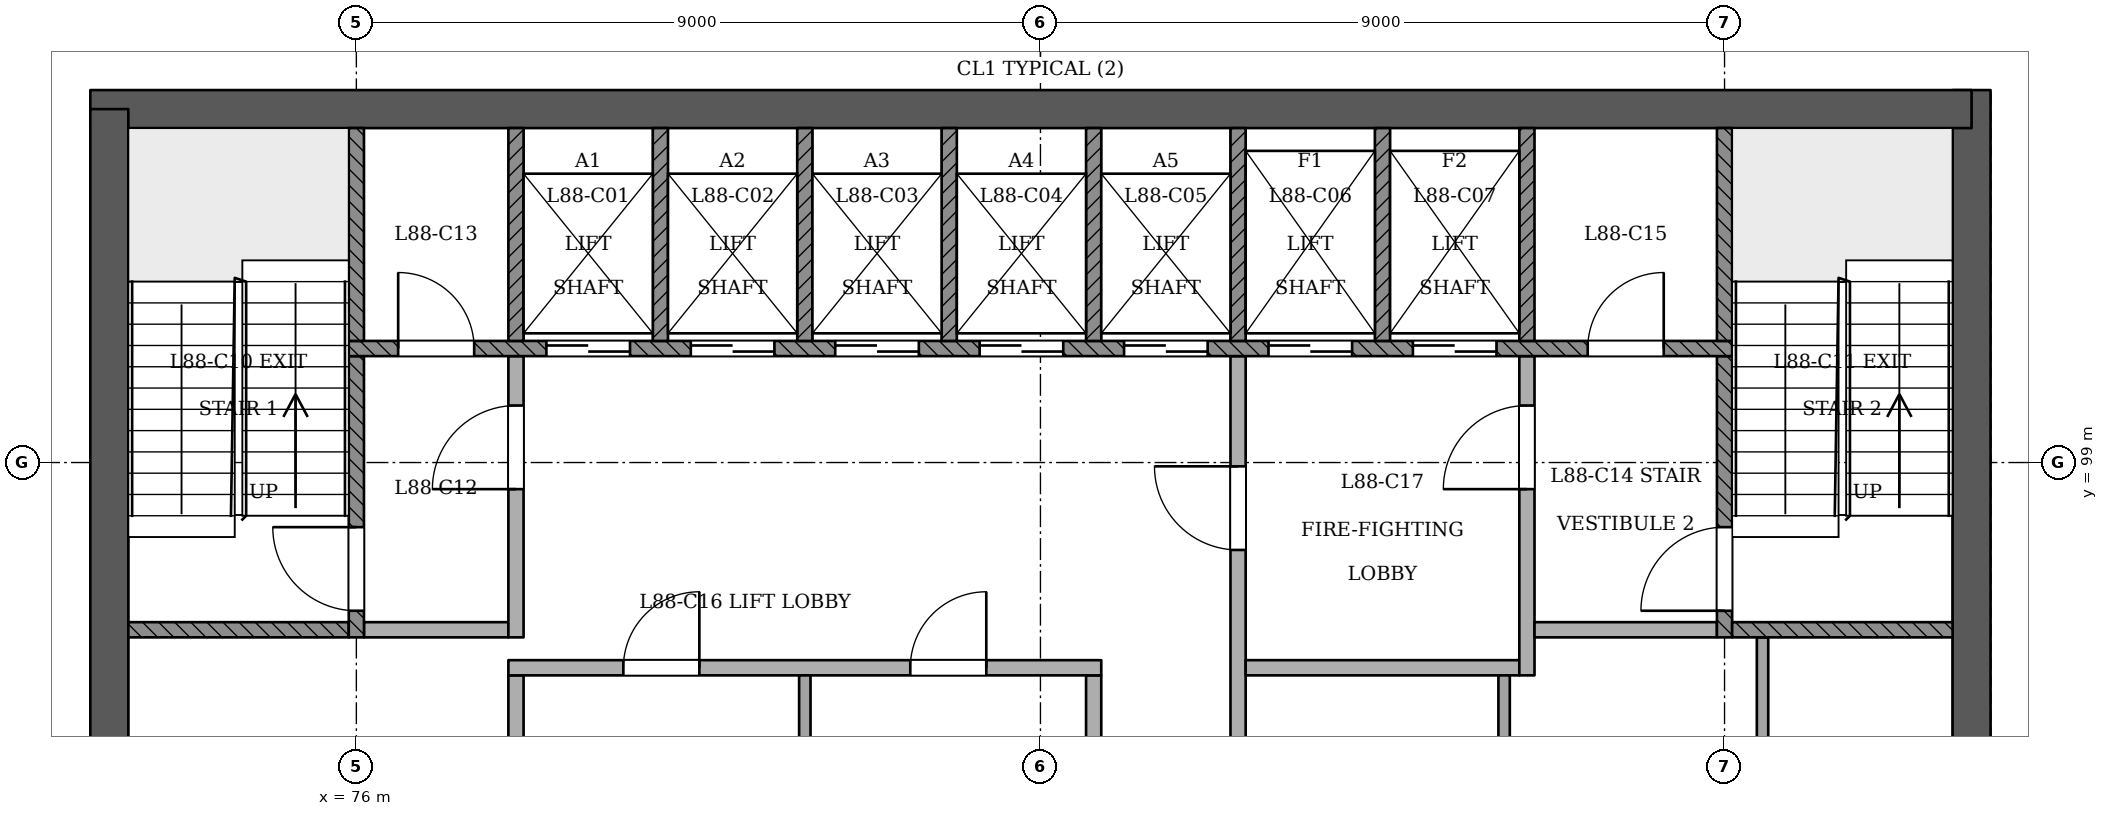
"""IFC4 building model, lengths in metres.
Left out: names, types, materials, properties, quantities, classifications, styles, units other than length and angle.
Written with IfcOpenShell. Run it as: python <this file> out.ifc"""

import sys

from ifc_helpers import new_model, si_unit, direction, frame, frame_2d, origin, place, context, subcontext, project, spatial, rectangle, extrude, element, fill, save


model = new_model("IFC4")
c1 = context("Model", 3, precision=1e-05, world=origin(), true_north=direction((0.0, 1.0)))
c2 = subcontext(c1, "Body", "Model", "MODEL_VIEW")
j1 = project(units=[si_unit("LENGTHUNIT", "METRE"), si_unit("PLANEANGLEUNIT", "RADIAN")], contexts=[c1])
p1 = place(None, origin())
s1 = spatial("IfcSite", under=j1, at=p1, CompositionType="ELEMENT")
p2 = place(p1, origin())
s2 = spatial("IfcBuilding", under=s1, at=p2, CompositionType="ELEMENT")
p3 = place(p2, frame((0.0, 0.0, 338.8)))
s3 = spatial("IfcBuildingStorey", under=s2, at=p3, CompositionType="ELEMENT", Elevation=338.8)
p4 = place(p3, frame((97.25, 93.15, 0.0), z_axis=(0.0, 0.0, 1.0), x_axis=(0.0, 1.0, 0.0)))
e1 = element("IfcWall", 1, at=p4, inside=s3, PredefinedType="SHEAR", context=c2, shape_type="SweptSolid", body=[
    extrude(rectangle(XDim=10.75, YDim=0.5, at=frame_2d((5.375, 0.0))), origin(), (0.0, 0.0, 1.0), 4.2),
])
p5 = place(p3, frame((97.25, 103.65, 0.0), z_axis=(0.0, 0.0, 1.0), x_axis=(-1.0, 0.0, 0.0)))
e2 = element("IfcWall", 2, at=p5, inside=s3, PredefinedType="SHEAR", context=c2, shape_type="SweptSolid", body=[
    extrude(rectangle(XDim=24.75, YDim=0.5, at=frame_2d((12.375, 0.0))), origin(), (0.0, 0.0, 1.0), 4.2),
])
p6 = place(p3, frame((72.75, 103.65, 0.0), z_axis=(0.0, 0.0, 1.0), x_axis=(0.0, -1.0, 0.0)))
e3 = element("IfcWall", 3, at=p6, inside=s3, PredefinedType="SHEAR", context=c2, shape_type="SweptSolid", body=[
    extrude(rectangle(XDim=10.75, YDim=0.5, at=frame_2d((5.375, 0.0))), origin(), (0.0, 0.0, 1.0), 4.2),
])
p7 = place(p3, frame((78.1, 93.4, 0.0), z_axis=(0.0, 0.0, 1.0), x_axis=(0.0, 1.0, 0.0)))
e4 = element("IfcWall", 4, at=p7, inside=s3, PredefinedType="PARTITIONING", context=c2, shape_type="SweptSolid", body=[
    extrude(rectangle(XDim=2.8, YDim=0.2, at=frame_2d((1.4, 0.0))), origin(), (0.0, 0.0, 1.0), 3.9),
])
p8 = place(p3, frame((81.9, 93.4, 0.0), z_axis=(0.0, 0.0, 1.0), x_axis=(0.0, 1.0, 0.0)))
e5 = element("IfcWall", 5, at=p8, inside=s3, PredefinedType="PARTITIONING", context=c2, shape_type="SweptSolid", body=[
    extrude(rectangle(XDim=2.8, YDim=0.15, at=frame_2d((1.4, 0.0))), origin(), (0.0, 0.0, 1.0), 3.9),
])
p9 = place(p3, frame((85.7, 93.4, 0.0), z_axis=(0.0, 0.0, 1.0), x_axis=(0.0, 1.0, 0.0)))
e6 = element("IfcWall", 6, at=p9, inside=s3, PredefinedType="PARTITIONING", context=c2, shape_type="SweptSolid", body=[
    extrude(rectangle(XDim=2.8, YDim=0.2, at=frame_2d((1.4, 0.0))), origin(), (0.0, 0.0, 1.0), 3.9),
])
p10 = place(p3, frame((87.6, 93.4, 0.0), z_axis=(0.0, 0.0, 1.0), x_axis=(0.0, 1.0, 0.0)))
e7 = element("IfcWall", 7, at=p10, inside=s3, PredefinedType="PARTITIONING", context=c2, shape_type="SweptSolid", body=[
    extrude(rectangle(XDim=7.0, YDim=0.2, at=frame_2d((3.5, 0.0))), origin(), (0.0, 0.0, 1.0), 3.9),
])
p11 = place(p10, frame((4.45, 0.0, 0.0)))
e8 = element("IfcOpeningElement", 8, at=p11, cuts=e7, PredefinedType="OPENING", context=c2, shape_type="SweptSolid", body=[
    extrude(rectangle(XDim=1.1, YDim=2.1, at=frame_2d((0.55, 1.05))), frame((0.0, 0.11, 0.0), z_axis=(0.0, -1.0, 0.0), x_axis=(1.0, 0.0, 0.0)), (0.0, 0.0, 1.0), 0.221),
])
p12 = place(p3, frame((91.1, 93.4, 0.0), z_axis=(0.0, 0.0, 1.0), x_axis=(0.0, 1.0, 0.0)))
e9 = element("IfcWall", 9, at=p12, inside=s3, PredefinedType="PARTITIONING", context=c2, shape_type="SweptSolid", body=[
    extrude(rectangle(XDim=2.8, YDim=0.15, at=frame_2d((1.4, 0.0))), origin(), (0.0, 0.0, 1.0), 3.9),
])
p13 = place(p3, frame((94.5, 93.4, 0.0), z_axis=(0.0, 0.0, 1.0), x_axis=(0.0, 1.0, 0.0)))
e10 = element("IfcWall", 10, at=p13, inside=s3, PredefinedType="PARTITIONING", context=c2, shape_type="SweptSolid", body=[
    extrude(rectangle(XDim=3.3, YDim=0.15, at=frame_2d((1.65, 0.0))), origin(), (0.0, 0.0, 1.0), 3.9),
])
p14 = place(p3, frame((78.0, 96.3, 0.0), z_axis=(0.0, 0.0, 1.0), x_axis=(1.0, 0.0, 0.0)))
e11 = element("IfcWall", 11, at=p14, inside=s3, PredefinedType="PARTITIONING", context=c2, shape_type="SweptSolid", body=[
    extrude(rectangle(XDim=7.8, YDim=0.2, at=frame_2d((3.9, 0.0))), origin(), (0.0, 0.0, 1.0), 3.9),
])
p15 = place(p14, frame((1.512, 0.0, 0.0)))
e12 = element("IfcOpeningElement", 12, at=p15, cuts=e11, PredefinedType="OPENING", context=c2, shape_type="SweptSolid", body=[
    extrude(rectangle(XDim=1.0, YDim=2.1, at=frame_2d((0.5, 1.05))), frame((0.0, 0.11, 0.0), z_axis=(0.0, -1.0, 0.0), x_axis=(1.0, 0.0, 0.0)), (0.0, 0.0, 1.0), 0.221),
])
p16 = place(p14, frame((5.288, 0.0, 0.0)))
e13 = element("IfcOpeningElement", 13, at=p16, cuts=e11, PredefinedType="OPENING", context=c2, shape_type="SweptSolid", body=[
    extrude(rectangle(XDim=1.0, YDim=2.1, at=frame_2d((0.5, 1.05))), frame((0.0, 0.11, 0.0), z_axis=(0.0, -1.0, 0.0), x_axis=(1.0, 0.0, 0.0)), (0.0, 0.0, 1.0), 0.221),
])
p17 = place(p3, frame((87.7, 96.3, 0.0), z_axis=(0.0, 0.0, 1.0), x_axis=(1.0, 0.0, 0.0)))
e14 = element("IfcWall", 14, at=p17, inside=s3, PredefinedType="PARTITIONING", context=c2, shape_type="SweptSolid", body=[
    extrude(rectangle(XDim=3.6, YDim=0.2, at=frame_2d((1.8, 0.0))), origin(), (0.0, 0.0, 1.0), 3.9),
])
p18 = place(p3, frame((91.4, 96.2, 0.0), z_axis=(0.0, 0.0, 1.0), x_axis=(0.0, 1.0, 0.0)))
e15 = element("IfcWall", 15, at=p18, inside=s3, PredefinedType="PARTITIONING", context=c2, shape_type="SweptSolid", body=[
    extrude(rectangle(XDim=4.2, YDim=0.2, at=frame_2d((2.1, 0.0))), origin(), (0.0, 0.0, 1.0), 3.9),
])
p19 = place(p18, frame((2.45, 0.0, 0.0)))
e16 = element("IfcOpeningElement", 16, at=p19, cuts=e15, PredefinedType="OPENING", context=c2, shape_type="SweptSolid", body=[
    extrude(rectangle(XDim=1.1, YDim=2.1, at=frame_2d((0.55, 1.05))), frame((0.0, 0.11, 0.0), z_axis=(0.0, -1.0, 0.0), x_axis=(1.0, 0.0, 0.0)), (0.0, 0.0, 1.0), 0.221),
])
p20 = place(p3, frame((73.0, 96.8, 0.0), z_axis=(0.0, 0.0, 1.0), x_axis=(1.0, 0.0, 0.0)))
e17 = element("IfcWall", 17, at=p20, inside=s3, PredefinedType="SOLIDWALL", context=c2, shape_type="SweptSolid", body=[
    extrude(rectangle(XDim=2.9, YDim=0.2, at=frame_2d((1.45, 0.0))), origin(), (0.0, 0.0, 1.0), 3.9),
])
p21 = place(p3, frame((76.0, 96.7, 0.0), z_axis=(0.0, 0.0, 1.0), x_axis=(0.0, 1.0, 0.0)))
e18 = element("IfcWall", 18, at=p21, inside=s3, PredefinedType="SOLIDWALL", context=c2, shape_type="SweptSolid", body=[
    extrude(rectangle(XDim=3.7, YDim=0.2, at=frame_2d((1.85, 0.0))), origin(), (0.0, 0.0, 1.0), 3.9),
])
p22 = place(p21, frame((0.35, 0.0, 0.0)))
e19 = element("IfcOpeningElement", 19, at=p22, cuts=e18, PredefinedType="OPENING", context=c2, shape_type="SweptSolid", body=[
    extrude(rectangle(XDim=1.1, YDim=2.1, at=frame_2d((0.55, 1.05))), frame((0.0, 0.11, 0.0), z_axis=(0.0, -1.0, 0.0), x_axis=(1.0, 0.0, 0.0)), (0.0, 0.0, 1.0), 0.221),
])
p23 = place(p3, frame((76.1, 96.8, 0.0), z_axis=(0.0, 0.0, 1.0), x_axis=(1.0, 0.0, 0.0)))
e20 = element("IfcWall", 20, at=p23, inside=s3, PredefinedType="PARTITIONING", context=c2, shape_type="SweptSolid", body=[
    extrude(rectangle(XDim=1.9, YDim=0.2, at=frame_2d((0.95, 0.0))), origin(), (0.0, 0.0, 1.0), 3.9),
])
p24 = place(p3, frame((78.1, 96.7, 0.0), z_axis=(0.0, 0.0, 1.0), x_axis=(0.0, 1.0, 0.0)))
e21 = element("IfcWall", 21, at=p24, inside=s3, PredefinedType="PARTITIONING", context=c2, shape_type="SweptSolid", body=[
    extrude(rectangle(XDim=3.7, YDim=0.2, at=frame_2d((1.85, 0.0))), origin(), (0.0, 0.0, 1.0), 3.9),
])
p25 = place(p24, frame((1.95, 0.0, 0.0)))
e22 = element("IfcOpeningElement", 22, at=p25, cuts=e21, PredefinedType="OPENING", context=c2, shape_type="SweptSolid", body=[
    extrude(rectangle(XDim=1.1, YDim=2.1, at=frame_2d((0.55, 1.05))), frame((0.0, 0.11, 0.0), z_axis=(0.0, -1.0, 0.0), x_axis=(1.0, 0.0, 0.0)), (0.0, 0.0, 1.0), 0.221),
])
p26 = place(p3, frame((91.5, 96.8, 0.0), z_axis=(0.0, 0.0, 1.0), x_axis=(1.0, 0.0, 0.0)))
e23 = element("IfcWall", 23, at=p26, inside=s3, PredefinedType="PARTITIONING", context=c2, shape_type="SweptSolid", body=[
    extrude(rectangle(XDim=2.4, YDim=0.2, at=frame_2d((1.2, 0.0))), origin(), (0.0, 0.0, 1.0), 3.9),
])
p27 = place(p3, frame((94.0, 96.7, 0.0), z_axis=(0.0, 0.0, 1.0), x_axis=(0.0, 1.0, 0.0)))
e24 = element("IfcWall", 24, at=p27, inside=s3, PredefinedType="SOLIDWALL", context=c2, shape_type="SweptSolid", body=[
    extrude(rectangle(XDim=3.7, YDim=0.2, at=frame_2d((1.85, 0.0))), origin(), (0.0, 0.0, 1.0), 3.9),
])
p28 = place(p27, frame((0.35, 0.0, 0.0)))
e25 = element("IfcOpeningElement", 25, at=p28, cuts=e24, PredefinedType="OPENING", context=c2, shape_type="SweptSolid", body=[
    extrude(rectangle(XDim=1.1, YDim=2.1, at=frame_2d((0.55, 1.05))), frame((0.0, 0.11, 0.0), z_axis=(0.0, -1.0, 0.0), x_axis=(1.0, 0.0, 0.0)), (0.0, 0.0, 1.0), 0.221),
])
p29 = place(p3, frame((94.1, 96.8, 0.0), z_axis=(0.0, 0.0, 1.0), x_axis=(1.0, 0.0, 0.0)))
e26 = element("IfcWall", 26, at=p29, inside=s3, PredefinedType="SOLIDWALL", context=c2, shape_type="SweptSolid", body=[
    extrude(rectangle(XDim=2.9, YDim=0.2, at=frame_2d((1.45, 0.0))), origin(), (0.0, 0.0, 1.0), 3.9),
])
p30 = place(p3, frame((75.9, 100.5, 0.0), z_axis=(0.0, 0.0, 1.0), x_axis=(1.0, 0.0, 0.0)))
e27 = element("IfcWall", 27, at=p30, inside=s3, PredefinedType="SOLIDWALL", context=c2, shape_type="SweptSolid", body=[
    extrude(rectangle(XDim=18.2, YDim=0.2, at=frame_2d((9.1, 0.0))), origin(), (0.0, 0.0, 1.0), 3.9),
])
p31 = place(p30, frame((2.6, 0.0, 0.0)))
e28 = element("IfcOpeningElement", 28, at=p31, cuts=e27, PredefinedType="OPENING", context=c2, shape_type="SweptSolid", body=[
    extrude(rectangle(XDim=1.1, YDim=2.1, at=frame_2d((0.55, 1.05))), frame((0.0, 0.11, 0.0), z_axis=(0.0, -1.0, 0.0), x_axis=(1.0, 0.0, 0.0)), (0.0, 0.0, 1.0), 0.221),
])
p32 = place(p30, frame((4.5, 0.0, 0.0)))
e29 = element("IfcOpeningElement", 29, at=p32, cuts=e27, PredefinedType="OPENING", context=c2, shape_type="SweptSolid", body=[
    extrude(rectangle(XDim=1.1, YDim=2.1, at=frame_2d((0.55, 1.05))), frame((0.0, 0.11, 0.0), z_axis=(0.0, -1.0, 0.0), x_axis=(1.0, 0.0, 0.0)), (0.0, 0.0, 1.0), 0.221),
])
p33 = place(p30, frame((6.4, 0.0, 0.0)))
e30 = element("IfcOpeningElement", 30, at=p33, cuts=e27, PredefinedType="OPENING", context=c2, shape_type="SweptSolid", body=[
    extrude(rectangle(XDim=1.1, YDim=2.1, at=frame_2d((0.55, 1.05))), frame((0.0, 0.11, 0.0), z_axis=(0.0, -1.0, 0.0), x_axis=(1.0, 0.0, 0.0)), (0.0, 0.0, 1.0), 0.221),
])
p34 = place(p30, frame((8.3, 0.0, 0.0)))
e31 = element("IfcOpeningElement", 31, at=p34, cuts=e27, PredefinedType="OPENING", context=c2, shape_type="SweptSolid", body=[
    extrude(rectangle(XDim=1.1, YDim=2.1, at=frame_2d((0.55, 1.05))), frame((0.0, 0.11, 0.0), z_axis=(0.0, -1.0, 0.0), x_axis=(1.0, 0.0, 0.0)), (0.0, 0.0, 1.0), 0.221),
])
p35 = place(p30, frame((10.2, 0.0, 0.0)))
e32 = element("IfcOpeningElement", 32, at=p35, cuts=e27, PredefinedType="OPENING", context=c2, shape_type="SweptSolid", body=[
    extrude(rectangle(XDim=1.1, YDim=2.1, at=frame_2d((0.55, 1.05))), frame((0.0, 0.11, 0.0), z_axis=(0.0, -1.0, 0.0), x_axis=(1.0, 0.0, 0.0)), (0.0, 0.0, 1.0), 0.221),
])
p36 = place(p30, frame((12.1, 0.0, 0.0)))
e33 = element("IfcOpeningElement", 33, at=p36, cuts=e27, PredefinedType="OPENING", context=c2, shape_type="SweptSolid", body=[
    extrude(rectangle(XDim=1.1, YDim=2.1, at=frame_2d((0.55, 1.05))), frame((0.0, 0.11, 0.0), z_axis=(0.0, -1.0, 0.0), x_axis=(1.0, 0.0, 0.0)), (0.0, 0.0, 1.0), 0.221),
])
p37 = place(p30, frame((14.0, 0.0, 0.0)))
e34 = element("IfcOpeningElement", 34, at=p37, cuts=e27, PredefinedType="OPENING", context=c2, shape_type="SweptSolid", body=[
    extrude(rectangle(XDim=1.1, YDim=2.1, at=frame_2d((0.55, 1.05))), frame((0.0, 0.11, 0.0), z_axis=(0.0, -1.0, 0.0), x_axis=(1.0, 0.0, 0.0)), (0.0, 0.0, 1.0), 0.221),
])
p38 = place(p30, frame((0.65, 0.0, 0.0)))
e35 = element("IfcOpeningElement", 35, at=p38, cuts=e27, PredefinedType="OPENING", context=c2, shape_type="SweptSolid", body=[
    extrude(rectangle(XDim=1.0, YDim=2.1, at=frame_2d((0.5, 1.05))), frame((0.0, 0.11, 0.0), z_axis=(0.0, -1.0, 0.0), x_axis=(1.0, 0.0, 0.0)), (0.0, 0.0, 1.0), 0.221),
])
p39 = place(p30, frame((16.3, 0.0, 0.0)))
e36 = element("IfcOpeningElement", 36, at=p39, cuts=e27, PredefinedType="OPENING", context=c2, shape_type="SweptSolid", body=[
    extrude(rectangle(XDim=1.0, YDim=2.1, at=frame_2d((0.5, 1.05))), frame((0.0, 0.11, 0.0), z_axis=(0.0, -1.0, 0.0), x_axis=(1.0, 0.0, 0.0)), (0.0, 0.0, 1.0), 0.221),
])
for number, where, z_axis, x_axis in (
    (37, (76.0, 100.6, 0.0), (0.0, 0.0, 1.0), (0.0, 1.0, 0.0)),
    (38, (78.1, 100.6, 0.0), (0.0, 0.0, 1.0), (0.0, 1.0, 0.0)),
    (39, (80.0, 100.6, 0.0), (0.0, 0.0, 1.0), (0.0, 1.0, 0.0)),
    (40, (81.9, 100.6, 0.0), (0.0, 0.0, 1.0), (0.0, 1.0, 0.0)),
    (41, (83.8, 100.6, 0.0), (0.0, 0.0, 1.0), (0.0, 1.0, 0.0)),
    (42, (85.7, 100.6, 0.0), (0.0, 0.0, 1.0), (0.0, 1.0, 0.0)),
    (43, (87.6, 100.6, 0.0), (0.0, 0.0, 1.0), (0.0, 1.0, 0.0)),
    (44, (89.5, 100.6, 0.0), (0.0, 0.0, 1.0), (0.0, 1.0, 0.0)),
    (45, (91.4, 100.6, 0.0), (0.0, 0.0, 1.0), (0.0, 1.0, 0.0)),
    (46, (94.0, 100.6, 0.0), (0.0, 0.0, 1.0), (0.0, 1.0, 0.0)),
):
    element("IfcWall", number, at=place(p3, frame(where, z_axis=z_axis, x_axis=x_axis)), inside=s3, PredefinedType="SOLIDWALL", context=c2, shape_type="SweptSolid", body=[
        extrude(rectangle(XDim=2.8, YDim=0.2, at=frame_2d((1.4, 0.0))), origin(), (0.0, 0.0, 1.0), 3.9),
    ])
p40 = place(p31, origin())
e47 = element("IfcDoor", 47, at=p40, inside=s3, OperationType="SLIDING_TO_RIGHT", PredefinedType="NOTDEFINED", context=c2, shape_type="SweptSolid", body=[
    extrude(rectangle(XDim=1.1, YDim=2.1, at=frame_2d((0.55, 1.05))), frame((0.0, 0.025, 0.0), z_axis=(0.0, -1.0, 0.0), x_axis=(1.0, 0.0, 0.0)), (0.0, 0.0, 1.0), 0.05),
])
fill(e28, e47)
p41 = place(p32, origin())
e48 = element("IfcDoor", 48, at=p41, inside=s3, OperationType="SLIDING_TO_LEFT", PredefinedType="NOTDEFINED", context=c2, shape_type="SweptSolid", body=[
    extrude(rectangle(XDim=1.1, YDim=2.1, at=frame_2d((0.55, 1.05))), frame((0.0, 0.025, 0.0), z_axis=(0.0, -1.0, 0.0), x_axis=(1.0, 0.0, 0.0)), (0.0, 0.0, 1.0), 0.05),
])
fill(e29, e48)
p42 = place(p33, origin())
e49 = element("IfcDoor", 49, at=p42, inside=s3, OperationType="SLIDING_TO_RIGHT", PredefinedType="NOTDEFINED", context=c2, shape_type="SweptSolid", body=[
    extrude(rectangle(XDim=1.1, YDim=2.1, at=frame_2d((0.55, 1.05))), frame((0.0, 0.025, 0.0), z_axis=(0.0, -1.0, 0.0), x_axis=(1.0, 0.0, 0.0)), (0.0, 0.0, 1.0), 0.05),
])
fill(e30, e49)
p43 = place(p34, origin())
e50 = element("IfcDoor", 50, at=p43, inside=s3, OperationType="SLIDING_TO_LEFT", PredefinedType="NOTDEFINED", context=c2, shape_type="SweptSolid", body=[
    extrude(rectangle(XDim=1.1, YDim=2.1, at=frame_2d((0.55, 1.05))), frame((0.0, 0.025, 0.0), z_axis=(0.0, -1.0, 0.0), x_axis=(1.0, 0.0, 0.0)), (0.0, 0.0, 1.0), 0.05),
])
fill(e31, e50)
p44 = place(p35, origin())
e51 = element("IfcDoor", 51, at=p44, inside=s3, OperationType="SLIDING_TO_RIGHT", PredefinedType="NOTDEFINED", context=c2, shape_type="SweptSolid", body=[
    extrude(rectangle(XDim=1.1, YDim=2.1, at=frame_2d((0.55, 1.05))), frame((0.0, 0.025, 0.0), z_axis=(0.0, -1.0, 0.0), x_axis=(1.0, 0.0, 0.0)), (0.0, 0.0, 1.0), 0.05),
])
fill(e32, e51)
p45 = place(p36, origin())
e52 = element("IfcDoor", 52, at=p45, inside=s3, OperationType="SLIDING_TO_RIGHT", PredefinedType="NOTDEFINED", context=c2, shape_type="SweptSolid", body=[
    extrude(rectangle(XDim=1.1, YDim=2.1, at=frame_2d((0.55, 1.05))), frame((0.0, 0.025, 0.0), z_axis=(0.0, -1.0, 0.0), x_axis=(1.0, 0.0, 0.0)), (0.0, 0.0, 1.0), 0.05),
])
fill(e33, e52)
p46 = place(p37, origin())
e53 = element("IfcDoor", 53, at=p46, inside=s3, OperationType="SLIDING_TO_LEFT", PredefinedType="NOTDEFINED", context=c2, shape_type="SweptSolid", body=[
    extrude(rectangle(XDim=1.1, YDim=2.1, at=frame_2d((0.55, 1.05))), frame((0.0, 0.025, 0.0), z_axis=(0.0, -1.0, 0.0), x_axis=(1.0, 0.0, 0.0)), (0.0, 0.0, 1.0), 0.05),
])
fill(e34, e53)
p47 = place(p22, origin())
e54 = element("IfcDoor", 54, at=p47, inside=s3, OperationType="SINGLE_SWING_RIGHT", PredefinedType="NOTDEFINED", context=c2, shape_type="SweptSolid", body=[
    extrude(rectangle(XDim=1.1, YDim=2.1, at=frame_2d((0.55, 1.05))), frame((0.0, 0.025, 0.0), z_axis=(0.0, -1.0, 0.0), x_axis=(1.0, 0.0, 0.0)), (0.0, 0.0, 1.0), 0.05),
])
fill(e19, e54)
p48 = place(p28, origin())
e55 = element("IfcDoor", 55, at=p48, inside=s3, OperationType="SINGLE_SWING_LEFT", PredefinedType="NOTDEFINED", context=c2, shape_type="SweptSolid", body=[
    extrude(rectangle(XDim=1.1, YDim=2.1, at=frame_2d((0.55, 1.05))), frame((0.0, 0.025, 0.0), z_axis=(0.0, -1.0, 0.0), x_axis=(1.0, 0.0, 0.0)), (0.0, 0.0, 1.0), 0.05),
])
fill(e25, e55)
p49 = place(p25, origin())
e56 = element("IfcDoor", 56, at=p49, inside=s3, OperationType="SINGLE_SWING_LEFT", PredefinedType="NOTDEFINED", context=c2, shape_type="SweptSolid", body=[
    extrude(rectangle(XDim=1.1, YDim=2.1, at=frame_2d((0.55, 1.05))), frame((0.0, 0.025, 0.0), z_axis=(0.0, -1.0, 0.0), x_axis=(1.0, 0.0, 0.0)), (0.0, 0.0, 1.0), 0.05),
])
fill(e22, e56)
p50 = place(p11, origin())
e57 = element("IfcDoor", 57, at=p50, inside=s3, OperationType="SINGLE_SWING_RIGHT", PredefinedType="NOTDEFINED", context=c2, shape_type="SweptSolid", body=[
    extrude(rectangle(XDim=1.1, YDim=2.1, at=frame_2d((0.55, 1.05))), frame((0.0, 0.025, 0.0), z_axis=(0.0, -1.0, 0.0), x_axis=(1.0, 0.0, 0.0)), (0.0, 0.0, 1.0), 0.05),
])
fill(e8, e57)
p51 = place(p19, origin())
e58 = element("IfcDoor", 58, at=p51, inside=s3, OperationType="SINGLE_SWING_LEFT", PredefinedType="NOTDEFINED", context=c2, shape_type="SweptSolid", body=[
    extrude(rectangle(XDim=1.1, YDim=2.1, at=frame_2d((0.55, 1.05))), frame((0.0, 0.025, 0.0), z_axis=(0.0, -1.0, 0.0), x_axis=(1.0, 0.0, 0.0)), (0.0, 0.0, 1.0), 0.05),
])
fill(e16, e58)
p52 = place(p38, origin())
e59 = element("IfcDoor", 59, at=p52, inside=s3, OperationType="SINGLE_SWING_LEFT", PredefinedType="NOTDEFINED", context=c2, shape_type="SweptSolid", body=[
    extrude(rectangle(XDim=1.0, YDim=2.1, at=frame_2d((0.5, 1.05))), frame((0.0, 0.025, 0.0), z_axis=(0.0, -1.0, 0.0), x_axis=(1.0, 0.0, 0.0)), (0.0, 0.0, 1.0), 0.05),
])
fill(e35, e59)
p53 = place(p39, origin())
e60 = element("IfcDoor", 60, at=p53, inside=s3, OperationType="SINGLE_SWING_RIGHT", PredefinedType="NOTDEFINED", context=c2, shape_type="SweptSolid", body=[
    extrude(rectangle(XDim=1.0, YDim=2.1, at=frame_2d((0.5, 1.05))), frame((0.0, 0.025, 0.0), z_axis=(0.0, -1.0, 0.0), x_axis=(1.0, 0.0, 0.0)), (0.0, 0.0, 1.0), 0.05),
])
fill(e36, e60)
p54 = place(p15, origin())
e61 = element("IfcDoor", 61, at=p54, inside=s3, OperationType="SINGLE_SWING_RIGHT", PredefinedType="NOTDEFINED", context=c2, shape_type="SweptSolid", body=[
    extrude(rectangle(XDim=1.0, YDim=2.1, at=frame_2d((0.5, 1.05))), frame((0.0, 0.025, 0.0), z_axis=(0.0, -1.0, 0.0), x_axis=(1.0, 0.0, 0.0)), (0.0, 0.0, 1.0), 0.05),
])
fill(e12, e61)
p55 = place(p16, origin())
e62 = element("IfcDoor", 62, at=p55, inside=s3, OperationType="SINGLE_SWING_RIGHT", PredefinedType="NOTDEFINED", context=c2, shape_type="SweptSolid", body=[
    extrude(rectangle(XDim=1.0, YDim=2.1, at=frame_2d((0.5, 1.05))), frame((0.0, 0.025, 0.0), z_axis=(0.0, -1.0, 0.0), x_axis=(1.0, 0.0, 0.0)), (0.0, 0.0, 1.0), 0.05),
])
fill(e13, e62)
save(model, sys.argv[1])
